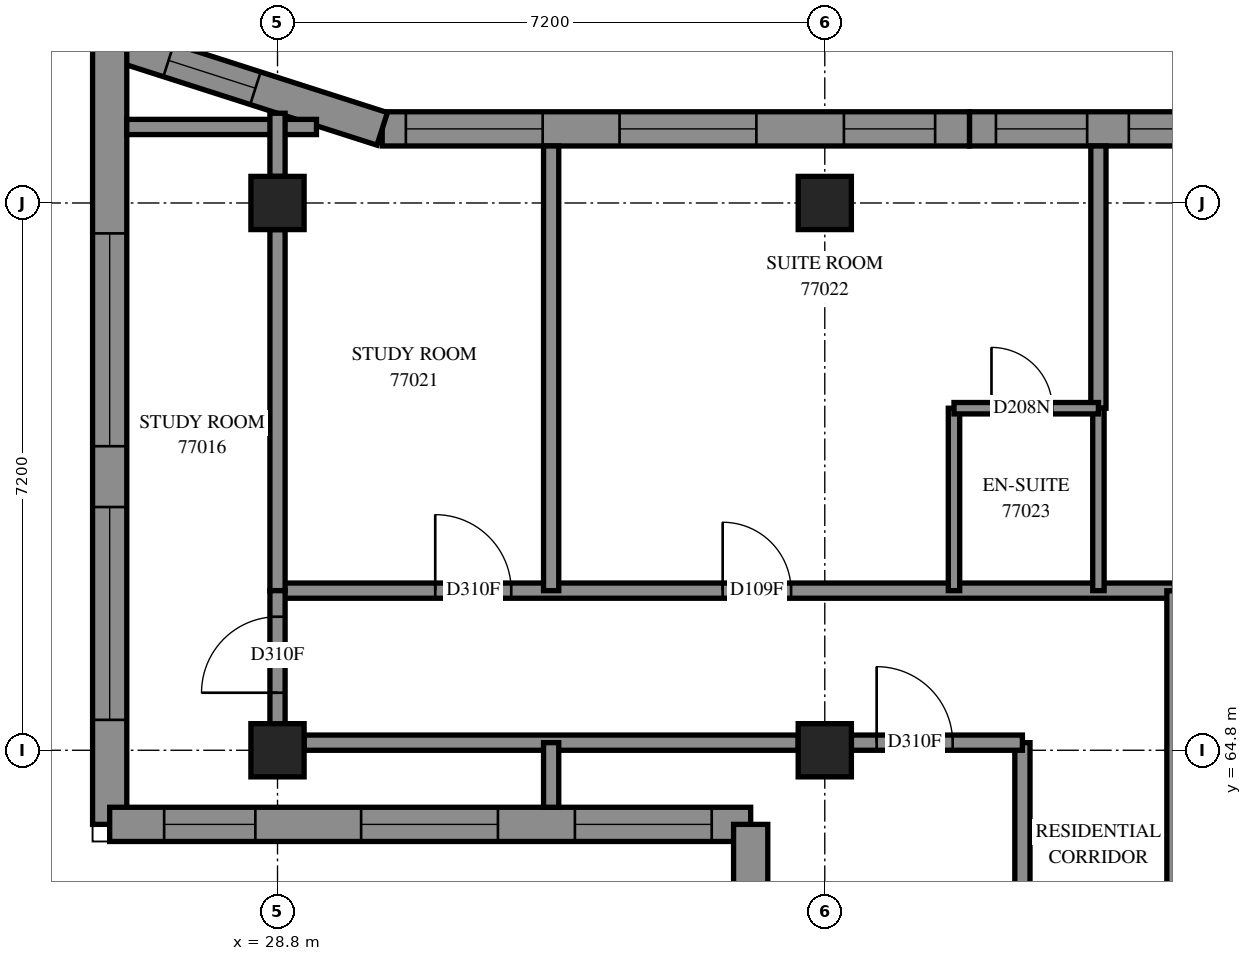
"""IFC4 building model, lengths in metres.
Left out: names, types, materials, properties, quantities, classifications, styles, units other than length and angle.
Written with IfcOpenShell. Run it as: python <this file> out.ifc"""

import sys

from ifc_helpers import new_model, si_unit, direction, frame, frame_2d, origin, origin_2d, place, context, subcontext, project, spatial, polyline, rectangle, outline, extrude, element, fill, save


model = new_model("IFC4")
c1 = context("Model", 3, precision=1e-05, world=origin(), true_north=direction((0.0, 1.0)))
c2 = subcontext(c1, "Body", "Model", "MODEL_VIEW")
j1 = project(units=[si_unit("LENGTHUNIT", "METRE"), si_unit("PLANEANGLEUNIT", "RADIAN")], contexts=[c1])
p1 = place(None, origin())
s1 = spatial("IfcSite", under=j1, at=p1, CompositionType="ELEMENT")
p2 = place(p1, origin())
s2 = spatial("IfcBuilding", under=s1, at=p2, CompositionType="ELEMENT")
p3 = place(p2, frame((0.0, 0.0, 281.2)))
s3 = spatial("IfcBuildingStorey", under=s2, at=p3, CompositionType="ELEMENT", Elevation=281.2)
for number, where, z_axis, x_axis in (
    (1, (28.8, 64.8, 0.0), (0.0, 0.0, 1.0), (1.0, 0.0, 0.0)),
    (2, (28.8, 72.0, 0.0), (0.0, 0.0, 1.0), (1.0, 0.0, 0.0)),
    (3, (36.0, 64.8, 0.0), (0.0, 0.0, 1.0), (1.0, 0.0, 0.0)),
    (4, (36.0, 72.0, 0.0), (0.0, 0.0, 1.0), (1.0, 0.0, 0.0)),
):
    element("IfcColumn", number, at=place(p3, frame(where, z_axis=z_axis, x_axis=x_axis)), inside=s3, PredefinedType="COLUMN", context=c2, shape_type="SweptSolid", body=[
        extrude(rectangle(XDim=0.7, YDim=0.7, at=origin_2d()), origin(), (0.0, 0.0, 1.0), 3.1),
    ])
p4 = place(p3, frame((45.594, 72.975, 0.0), z_axis=(0.0, 0.0, 1.0), x_axis=(-1.0, 0.0, 0.0)))
e5 = element("IfcWall", 5, at=p4, inside=s3, PredefinedType="SOLIDWALL", context=c2, shape_type="SweptSolid", body=[
    extrude(outline(polyline([(0.0, -0.225), (7.691, -0.225), (7.691, 0.225), (0.0, 0.225), (0.0, -0.225)])), origin(), (0.0, 0.0, 1.0), 3.1),
])
p5 = place(p4, frame((2.794, 0.0, 0.45)))
e6 = element("IfcOpeningElement", 6, at=p5, cuts=e5, PredefinedType="OPENING", context=c2, shape_type="SweptSolid", body=[
    extrude(rectangle(XDim=2.8, YDim=2.55, at=frame_2d((1.4, 1.275))), frame((0.0, 0.235, 0.0), z_axis=(0.0, -1.0, 0.0), x_axis=(1.0, 0.0, 0.0)), (0.0, 0.0, 1.0), 0.47),
])
p6 = place(p4, frame((0.697, 0.0, 0.45)))
e7 = element("IfcOpeningElement", 7, at=p6, cuts=e5, PredefinedType="OPENING", context=c2, shape_type="SweptSolid", body=[
    extrude(rectangle(XDim=1.2, YDim=2.55, at=frame_2d((0.6, 1.275))), frame((0.0, 0.235, 0.0), z_axis=(0.0, -1.0, 0.0), x_axis=(1.0, 0.0, 0.0)), (0.0, 0.0, 1.0), 0.47),
])
p7 = place(p4, frame((6.143, 0.0, 0.45)))
e8 = element("IfcOpeningElement", 8, at=p7, cuts=e5, PredefinedType="OPENING", context=c2, shape_type="SweptSolid", body=[
    extrude(rectangle(XDim=1.2, YDim=2.55, at=frame_2d((0.6, 1.275))), frame((0.0, 0.235, 0.0), z_axis=(0.0, -1.0, 0.0), x_axis=(1.0, 0.0, 0.0)), (0.0, 0.0, 1.0), 0.47),
])
p8 = place(p3, frame((37.903, 72.975, 0.0), z_axis=(0.0, 0.0, 1.0), x_axis=(-1.0, 0.0, 0.0)))
e9 = element("IfcWall", 9, at=p8, inside=s3, PredefinedType="SOLIDWALL", context=c2, shape_type="SweptSolid", body=[
    extrude(outline(polyline([(0.0, -0.225), (7.691, -0.225), (7.761, 0.225), (0.0, 0.225), (0.0, -0.225)])), origin(), (0.0, 0.0, 1.0), 2.6),
])
p9 = place(p8, frame((2.803, 0.0, 0.6)))
e10 = element("IfcOpeningElement", 10, at=p9, cuts=e9, PredefinedType="OPENING", context=c2, shape_type="SweptSolid", body=[
    extrude(rectangle(XDim=1.8, YDim=1.9, at=frame_2d((0.9, 0.95))), frame((0.0, 0.235, 0.0), z_axis=(0.0, -1.0, 0.0), x_axis=(1.0, 0.0, 0.0)), (0.0, 0.0, 1.0), 0.47),
])
p10 = place(p8, frame((5.615, 0.0, 0.6)))
e11 = element("IfcOpeningElement", 11, at=p10, cuts=e9, PredefinedType="OPENING", context=c2, shape_type="SweptSolid", body=[
    extrude(rectangle(XDim=1.8, YDim=1.9, at=frame_2d((0.9, 0.95))), frame((0.0, 0.235, 0.0), z_axis=(0.0, -1.0, 0.0), x_axis=(1.0, 0.0, 0.0)), (0.0, 0.0, 1.0), 0.47),
])
p11 = place(p8, frame((0.452, 0.0, 0.6)))
e12 = element("IfcOpeningElement", 12, at=p11, cuts=e9, PredefinedType="OPENING", context=c2, shape_type="SweptSolid", body=[
    extrude(rectangle(XDim=1.2, YDim=1.9, at=frame_2d((0.6, 0.95))), frame((0.0, 0.235, 0.0), z_axis=(0.0, -1.0, 0.0), x_axis=(1.0, 0.0, 0.0)), (0.0, 0.0, 1.0), 0.47),
])
p12 = place(p3, frame((30.177, 72.975, 0.0), z_axis=(0.0, 0.0, 1.0), x_axis=(-0.9522463551, 0.30533077, 0.0)))
e13 = element("IfcWall", 13, at=p12, inside=s3, PredefinedType="SOLIDWALL", context=c2, shape_type="SweptSolid", body=[
    extrude(outline(polyline([(0.035, -0.225), (4.074, -0.225), (3.457, 0.225), (-0.035, 0.225), (0.035, -0.225)])), origin(), (0.0, 0.0, 1.0), 3.1),
])
p13 = place(p12, frame((1.752, 0.0, 0.45)))
e14 = element("IfcOpeningElement", 14, at=p13, cuts=e13, PredefinedType="OPENING", context=c2, shape_type="SweptSolid", body=[
    extrude(rectangle(XDim=1.2, YDim=2.55, at=frame_2d((0.6, 1.275))), frame((0.0, 0.235, 0.0), z_axis=(0.0, -1.0, 0.0), x_axis=(1.0, 0.0, 0.0)), (0.0, 0.0, 1.0), 0.47),
])
p14 = place(p3, frame((26.592, 74.125, 0.0), z_axis=(0.0, 0.0, 1.0), x_axis=(0.0, -1.0, 0.0)))
e15 = element("IfcWall", 15, at=p14, inside=s3, PredefinedType="SOLIDWALL", context=c2, shape_type="SweptSolid", body=[
    extrude(outline(polyline([(-0.308, -0.225), (10.525, -0.225), (10.075, 0.225), (0.308, 0.225), (-0.308, -0.225)])), origin(), (0.0, 0.0, 1.0), 3.1),
])
p15 = place(p14, frame((2.525, 0.0, 0.45)))
e16 = element("IfcOpeningElement", 16, at=p15, cuts=e15, PredefinedType="OPENING", context=c2, shape_type="SweptSolid", body=[
    extrude(rectangle(XDim=2.8, YDim=2.55, at=frame_2d((1.4, 1.275))), frame((0.0, 0.235, 0.0), z_axis=(0.0, -1.0, 0.0), x_axis=(1.0, 0.0, 0.0)), (0.0, 0.0, 1.0), 0.47),
])
p16 = place(p14, frame((6.125, 0.0, 0.45)))
e17 = element("IfcOpeningElement", 17, at=p16, cuts=e15, PredefinedType="OPENING", context=c2, shape_type="SweptSolid", body=[
    extrude(rectangle(XDim=2.8, YDim=2.55, at=frame_2d((1.4, 1.275))), frame((0.0, 0.235, 0.0), z_axis=(0.0, -1.0, 0.0), x_axis=(1.0, 0.0, 0.0)), (0.0, 0.0, 1.0), 0.47),
])
p17 = place(p3, frame((26.592, 63.825, 0.0), z_axis=(0.0, 0.0, 1.0), x_axis=(1.0, 0.0, 0.0)))
e18 = element("IfcWall", 18, at=p17, inside=s3, PredefinedType="SOLIDWALL", context=c2, shape_type="SweptSolid", body=[
    extrude(outline(polyline([(-0.225, -0.225), (8.208, -0.225), (8.658, 0.225), (0.225, 0.225), (-0.225, -0.225)])), origin(), (0.0, 0.0, 1.0), 2.6),
])
p18 = place(p17, frame((3.308, 0.0, 0.6)))
e19 = element("IfcOpeningElement", 19, at=p18, cuts=e18, PredefinedType="OPENING", context=c2, shape_type="SweptSolid", body=[
    extrude(rectangle(XDim=1.8, YDim=1.9, at=frame_2d((0.9, 0.95))), frame((0.0, 0.235, 0.0), z_axis=(0.0, -1.0, 0.0), x_axis=(1.0, 0.0, 0.0)), (0.0, 0.0, 1.0), 0.47),
])
p19 = place(p17, frame((6.12, 0.0, 0.6)))
e20 = element("IfcOpeningElement", 20, at=p19, cuts=e18, PredefinedType="OPENING", context=c2, shape_type="SweptSolid", body=[
    extrude(rectangle(XDim=1.8, YDim=1.9, at=frame_2d((0.9, 0.95))), frame((0.0, 0.235, 0.0), z_axis=(0.0, -1.0, 0.0), x_axis=(1.0, 0.0, 0.0)), (0.0, 0.0, 1.0), 0.47),
])
p20 = place(p17, frame((0.717, 0.0, 0.6)))
e21 = element("IfcOpeningElement", 21, at=p20, cuts=e18, PredefinedType="OPENING", context=c2, shape_type="SweptSolid", body=[
    extrude(rectangle(XDim=1.2, YDim=1.9, at=frame_2d((0.6, 0.95))), frame((0.0, 0.235, 0.0), z_axis=(0.0, -1.0, 0.0), x_axis=(1.0, 0.0, 0.0)), (0.0, 0.0, 1.0), 0.47),
])
p21 = place(p3, frame((35.025, 63.825, 0.0), z_axis=(0.0, 0.0, 1.0), x_axis=(0.0, -1.0, 0.0)))
e22 = element("IfcWall", 22, at=p21, inside=s3, PredefinedType="SOLIDWALL", context=c2, shape_type="SweptSolid", body=[
    extrude(outline(polyline([(0.225, -0.225), (7.425, -0.225), (6.975, 0.225), (-0.225, 0.225), (0.225, -0.225)])), origin(), (0.0, 0.0, 1.0), 2.6),
])
p22 = place(p21, frame((3.725, 0.0, 0.6)))
e23 = element("IfcOpeningElement", 23, at=p22, cuts=e22, PredefinedType="OPENING", context=c2, shape_type="SweptSolid", body=[
    extrude(rectangle(XDim=1.8, YDim=1.9, at=frame_2d((0.9, 0.95))), frame((0.0, 0.235, 0.0), z_axis=(0.0, -1.0, 0.0), x_axis=(1.0, 0.0, 0.0)), (0.0, 0.0, 1.0), 0.47),
])
p23 = place(p21, frame((2.1, 0.0, 0.6)))
e24 = element("IfcOpeningElement", 24, at=p23, cuts=e22, PredefinedType="OPENING", context=c2, shape_type="SweptSolid", body=[
    extrude(rectangle(XDim=1.2, YDim=1.9, at=frame_2d((0.6, 0.95))), frame((0.0, 0.235, 0.0), z_axis=(0.0, -1.0, 0.0), x_axis=(1.0, 0.0, 0.0)), (0.0, 0.0, 1.0), 0.47),
])
p24 = place(p3, frame((28.8, 66.9, 0.0), z_axis=(0.0, 0.0, 1.0), x_axis=(1.0, 0.0, 0.0)))
e25 = element("IfcWall", 25, at=p24, inside=s3, PredefinedType="PARTITIONING", context=c2, shape_type="SweptSolid", body=[
    extrude(rectangle(XDim=11.8, YDim=0.2, at=frame_2d((5.9, 0.0))), origin(), (0.0, 0.0, 1.0), 3.1),
])
p25 = place(p24, frame((2.075, 0.0, 0.0)))
e26 = element("IfcOpeningElement", 26, at=p25, cuts=e25, PredefinedType="OPENING", context=c2, shape_type="SweptSolid", body=[
    extrude(rectangle(XDim=1.0, YDim=2.1, at=frame_2d((0.5, 1.05))), frame((0.0, 0.11, 0.0), z_axis=(0.0, -1.0, 0.0), x_axis=(1.0, 0.0, 0.0)), (0.0, 0.0, 1.0), 0.22),
])
p26 = place(p24, frame((5.857, 0.0, 0.0)))
e27 = element("IfcOpeningElement", 27, at=p26, cuts=e25, PredefinedType="OPENING", context=c2, shape_type="SweptSolid", body=[
    extrude(rectangle(XDim=0.9, YDim=2.1, at=frame_2d((0.45, 1.05))), frame((0.0, 0.11, 0.0), z_axis=(0.0, -1.0, 0.0), x_axis=(1.0, 0.0, 0.0)), (0.0, 0.0, 1.0), 0.22),
])
p27 = place(p3, frame((29.15, 64.9, 0.0), z_axis=(0.0, 0.0, 1.0), x_axis=(1.0, 0.0, 0.0)))
e28 = element("IfcWall", 28, at=p27, inside=s3, PredefinedType="PARTITIONING", context=c2, shape_type="SweptSolid", body=[
    extrude(rectangle(XDim=6.5, YDim=0.2, at=frame_2d((3.25, 0.0))), origin(), (0.0, 0.0, 1.0), 2.6),
])
p28 = place(p3, frame((32.4, 66.9, 0.0), z_axis=(0.0, 0.0, 1.0), x_axis=(0.0, 1.0, 0.0)))
e29 = element("IfcWall", 29, at=p28, inside=s3, PredefinedType="PARTITIONING", context=c2, shape_type="SweptSolid", body=[
    extrude(rectangle(XDim=5.85, YDim=0.2, at=frame_2d((2.925, 0.0))), origin(), (0.0, 0.0, 1.0), 3.1),
])
p29 = place(p3, frame((28.8, 66.9, 0.0), z_axis=(0.0, 0.0, 1.0), x_axis=(0.0, 1.0, 0.0)))
e30 = element("IfcWall", 30, at=p29, inside=s3, PredefinedType="PARTITIONING", context=c2, shape_type="SweptSolid", body=[
    extrude(rectangle(XDim=4.75, YDim=0.2, at=frame_2d((2.375, 0.0))), origin(), (0.0, 0.0, 1.0), 2.6),
])
p30 = place(p3, frame((40.6, 62.202, 0.0), z_axis=(0.0, 0.0, 1.0), x_axis=(0.0, 1.0, 0.0)))
e31 = element("IfcWall", 31, at=p30, inside=s3, PredefinedType="PARTITIONING", context=c2, shape_type="SweptSolid", body=[
    extrude(rectangle(XDim=4.696, YDim=0.2, at=frame_2d((2.348, 0.0))), origin(), (0.0, 0.0, 1.0), 3.1),
])
p31 = place(p3, frame((39.6, 69.3, 0.0), z_axis=(0.0, 0.0, 1.0), x_axis=(0.0, 1.0, 0.0)))
e32 = element("IfcWall", 32, at=p31, inside=s3, PredefinedType="PARTITIONING", context=c2, shape_type="SweptSolid", body=[
    extrude(rectangle(XDim=3.45, YDim=0.2, at=frame_2d((1.725, 0.0))), origin(), (0.0, 0.0, 1.0), 3.1),
])
p32 = place(p3, frame((38.6, 62.202, 0.0), z_axis=(0.0, 0.0, 1.0), x_axis=(0.0, 1.0, 0.0)))
e33 = element("IfcWall", 33, at=p32, inside=s3, PredefinedType="PARTITIONING", context=c2, shape_type="SweptSolid", body=[
    extrude(rectangle(XDim=2.698, YDim=0.2, at=frame_2d((1.349, 0.0))), origin(), (0.0, 0.0, 1.0), 3.1),
])
p33 = place(p3, frame((26.817, 73.0, 0.0), z_axis=(0.0, 0.0, 1.0), x_axis=(1.0, 0.0, 0.0)))
e34 = element("IfcWall", 34, at=p33, inside=s3, PredefinedType="PARTITIONING", context=c2, shape_type="SweptSolid", body=[
    extrude(rectangle(XDim=2.495, YDim=0.2, at=frame_2d((1.248, 0.0))), origin(), (0.0, 0.0, 1.0), 3.1),
])
for number, where, z_axis, x_axis in (
    (35, (37.7, 66.9, 0.0), (0.0, 0.0, 1.0), (0.0, 1.0, 0.0)),
    (36, (39.6, 66.9, 0.0), (0.0, 0.0, 1.0), (0.0, 1.0, 0.0)),
):
    element("IfcWall", number, at=place(p3, frame(where, z_axis=z_axis, x_axis=x_axis)), inside=s3, PredefinedType="PARTITIONING", context=c2, shape_type="SweptSolid", body=[
        extrude(rectangle(XDim=2.4, YDim=0.15, at=frame_2d((1.2, 0.0))), origin(), (0.0, 0.0, 1.0), 3.1),
    ])
p34 = place(p3, frame((36.35, 64.9, 0.0), z_axis=(0.0, 0.0, 1.0), x_axis=(1.0, 0.0, 0.0)))
e37 = element("IfcWall", 37, at=p34, inside=s3, PredefinedType="PARTITIONING", context=c2, shape_type="SweptSolid", body=[
    extrude(rectangle(XDim=2.25, YDim=0.2, at=frame_2d((1.125, 0.0))), origin(), (0.0, 0.0, 1.0), 3.1),
])
p35 = place(p34, frame((0.333, 0.0, 0.0)))
e38 = element("IfcOpeningElement", 38, at=p35, cuts=e37, PredefinedType="OPENING", context=c2, shape_type="SweptSolid", body=[
    extrude(rectangle(XDim=1.0, YDim=2.1, at=frame_2d((0.5, 1.05))), frame((0.0, 0.11, 0.0), z_axis=(0.0, -1.0, 0.0), x_axis=(1.0, 0.0, 0.0)), (0.0, 0.0, 1.0), 0.22),
])
p36 = place(p3, frame((37.7, 69.3, 0.0), z_axis=(0.0, 0.0, 1.0), x_axis=(1.0, 0.0, 0.0)))
e39 = element("IfcWall", 39, at=p36, inside=s3, PredefinedType="PARTITIONING", context=c2, shape_type="SweptSolid", body=[
    extrude(rectangle(XDim=1.9, YDim=0.15, at=frame_2d((0.95, 0.0))), origin(), (0.0, 0.0, 1.0), 3.1),
])
p37 = place(p36, frame((0.493, 0.0, 0.0)))
e40 = element("IfcOpeningElement", 40, at=p37, cuts=e39, PredefinedType="OPENING", context=c2, shape_type="SweptSolid", body=[
    extrude(rectangle(XDim=0.8, YDim=2.1, at=frame_2d((0.4, 1.05))), frame((0.0, 0.085, 0.0), z_axis=(0.0, -1.0, 0.0), x_axis=(1.0, 0.0, 0.0)), (0.0, 0.0, 1.0), 0.17),
])
p38 = place(p3, frame((28.8, 65.15, 0.0), z_axis=(0.0, 0.0, 1.0), x_axis=(0.0, 1.0, 0.0)))
e41 = element("IfcWall", 41, at=p38, inside=s3, PredefinedType="PARTITIONING", context=c2, shape_type="SweptSolid", body=[
    extrude(rectangle(XDim=1.75, YDim=0.2, at=frame_2d((0.875, 0.0))), origin(), (0.0, 0.0, 1.0), 2.6),
])
p39 = place(p38, frame((0.407, 0.0, 0.0)))
e42 = element("IfcOpeningElement", 42, at=p39, cuts=e41, PredefinedType="OPENING", context=c2, shape_type="SweptSolid", body=[
    extrude(rectangle(XDim=1.0, YDim=2.1, at=frame_2d((0.5, 1.05))), frame((0.0, 0.11, 0.0), z_axis=(0.0, -1.0, 0.0), x_axis=(1.0, 0.0, 0.0)), (0.0, 0.0, 1.0), 0.22),
])
p40 = place(p3, frame((32.4, 64.05, 0.0), z_axis=(0.0, 0.0, 1.0), x_axis=(0.0, 1.0, 0.0)))
e43 = element("IfcWall", 43, at=p40, inside=s3, PredefinedType="PARTITIONING", context=c2, shape_type="SweptSolid", body=[
    extrude(rectangle(XDim=0.85, YDim=0.2, at=frame_2d((0.425, 0.0))), origin(), (0.0, 0.0, 1.0), 3.1),
])
p41 = place(p3, frame((28.8, 72.35, 0.0), z_axis=(0.0, 0.0, 1.0), x_axis=(0.0, 1.0, 0.0)))
e44 = element("IfcWall", 44, at=p41, inside=s3, PredefinedType="PARTITIONING", context=c2, shape_type="SweptSolid", body=[
    extrude(rectangle(XDim=0.83, YDim=0.2, at=frame_2d((0.415, 0.0))), origin(), (0.0, 0.0, 1.0), 3.1),
])
p42 = place(p5, origin())
e45 = element("IfcWindow", 45, at=p42, inside=s3, PartitioningType="SINGLE_PANEL", PredefinedType="WINDOW", context=c2, shape_type="SweptSolid", body=[
    extrude(rectangle(XDim=2.8, YDim=2.55, at=frame_2d((1.4, 1.275))), frame((0.0, 0.205, 0.0), z_axis=(0.0, -1.0, 0.0), x_axis=(1.0, 0.0, 0.0)), (0.0, 0.0, 1.0), 0.06),
])
fill(e6, e45)
p43 = place(p7, origin())
e46 = element("IfcWindow", 46, at=p43, inside=s3, PartitioningType="SINGLE_PANEL", PredefinedType="WINDOW", context=c2, shape_type="SweptSolid", body=[
    extrude(rectangle(XDim=1.2, YDim=2.55, at=frame_2d((0.6, 1.275))), frame((0.0, 0.205, 0.0), z_axis=(0.0, -1.0, 0.0), x_axis=(1.0, 0.0, 0.0)), (0.0, 0.0, 1.0), 0.06),
])
fill(e8, e46)
p44 = place(p9, origin())
e47 = element("IfcWindow", 47, at=p44, inside=s3, PartitioningType="SINGLE_PANEL", PredefinedType="WINDOW", context=c2, shape_type="SweptSolid", body=[
    extrude(rectangle(XDim=1.8, YDim=1.9, at=frame_2d((0.9, 0.95))), frame((0.0, 0.205, 0.0), z_axis=(0.0, -1.0, 0.0), x_axis=(1.0, 0.0, 0.0)), (0.0, 0.0, 1.0), 0.06),
])
fill(e10, e47)
p45 = place(p10, origin())
e48 = element("IfcWindow", 48, at=p45, inside=s3, PartitioningType="SINGLE_PANEL", PredefinedType="WINDOW", context=c2, shape_type="SweptSolid", body=[
    extrude(rectangle(XDim=1.8, YDim=1.9, at=frame_2d((0.9, 0.95))), frame((0.0, 0.195, 0.0), z_axis=(0.0, -1.0, 0.0), x_axis=(1.0, 0.0, 0.0)), (0.0, 0.0, 1.0), 0.06),
])
fill(e11, e48)
p46 = place(p11, origin())
e49 = element("IfcWindow", 49, at=p46, inside=s3, PartitioningType="SINGLE_PANEL", PredefinedType="WINDOW", context=c2, shape_type="SweptSolid", body=[
    extrude(rectangle(XDim=1.2, YDim=1.9, at=frame_2d((0.6, 0.95))), frame((0.0, 0.205, 0.0), z_axis=(0.0, -1.0, 0.0), x_axis=(1.0, 0.0, 0.0)), (0.0, 0.0, 1.0), 0.06),
])
fill(e12, e49)
p47 = place(p13, origin())
e50 = element("IfcWindow", 50, at=p47, inside=s3, PartitioningType="SINGLE_PANEL", PredefinedType="WINDOW", context=c2, shape_type="SweptSolid", body=[
    extrude(rectangle(XDim=1.2, YDim=2.55, at=frame_2d((0.6, 1.275))), frame((0.0, 0.205, 0.0), z_axis=(0.0, -1.0, 0.0), x_axis=(1.0, 0.0, 0.0)), (0.0, 0.0, 1.0), 0.06),
])
fill(e14, e50)
p48 = place(p15, origin())
e51 = element("IfcWindow", 51, at=p48, inside=s3, PartitioningType="SINGLE_PANEL", PredefinedType="WINDOW", context=c2, shape_type="SweptSolid", body=[
    extrude(rectangle(XDim=2.8, YDim=2.55, at=frame_2d((1.4, 1.275))), frame((0.0, 0.205, 0.0), z_axis=(0.0, -1.0, 0.0), x_axis=(1.0, 0.0, 0.0)), (0.0, 0.0, 1.0), 0.06),
])
fill(e16, e51)
p49 = place(p16, origin())
e52 = element("IfcWindow", 52, at=p49, inside=s3, PartitioningType="SINGLE_PANEL", PredefinedType="WINDOW", context=c2, shape_type="SweptSolid", body=[
    extrude(rectangle(XDim=2.8, YDim=2.55, at=frame_2d((1.4, 1.275))), frame((0.0, 0.205, 0.0), z_axis=(0.0, -1.0, 0.0), x_axis=(1.0, 0.0, 0.0)), (0.0, 0.0, 1.0), 0.06),
])
fill(e17, e52)
p50 = place(p18, origin())
e53 = element("IfcWindow", 53, at=p50, inside=s3, PartitioningType="SINGLE_PANEL", PredefinedType="WINDOW", context=c2, shape_type="SweptSolid", body=[
    extrude(rectangle(XDim=1.8, YDim=1.9, at=frame_2d((0.9, 0.95))), frame((0.0, 0.205, 0.0), z_axis=(0.0, -1.0, 0.0), x_axis=(1.0, 0.0, 0.0)), (0.0, 0.0, 1.0), 0.06),
])
fill(e19, e53)
p51 = place(p19, origin())
e54 = element("IfcWindow", 54, at=p51, inside=s3, PartitioningType="SINGLE_PANEL", PredefinedType="WINDOW", context=c2, shape_type="SweptSolid", body=[
    extrude(rectangle(XDim=1.8, YDim=1.9, at=frame_2d((0.9, 0.95))), frame((0.0, 0.205, 0.0), z_axis=(0.0, -1.0, 0.0), x_axis=(1.0, 0.0, 0.0)), (0.0, 0.0, 1.0), 0.06),
])
fill(e20, e54)
p52 = place(p20, origin())
e55 = element("IfcWindow", 55, at=p52, inside=s3, PartitioningType="SINGLE_PANEL", PredefinedType="WINDOW", context=c2, shape_type="SweptSolid", body=[
    extrude(rectangle(XDim=1.2, YDim=1.9, at=frame_2d((0.6, 0.95))), frame((0.0, 0.205, 0.0), z_axis=(0.0, -1.0, 0.0), x_axis=(1.0, 0.0, 0.0)), (0.0, 0.0, 1.0), 0.06),
])
fill(e21, e55)
p53 = place(p39, origin())
e56 = element("IfcDoor", 56, at=p53, inside=s3, OperationType="SINGLE_SWING_LEFT", PredefinedType="DOOR", context=c2, shape_type="SweptSolid", body=[
    extrude(rectangle(XDim=1.0, YDim=2.1, at=frame_2d((0.5, 1.05))), frame((0.0, 0.025, 0.0), z_axis=(0.0, -1.0, 0.0), x_axis=(1.0, 0.0, 0.0)), (0.0, 0.0, 1.0), 0.05),
])
fill(e42, e56)
p54 = place(p25, origin())
e57 = element("IfcDoor", 57, at=p54, inside=s3, OperationType="SINGLE_SWING_RIGHT", PredefinedType="DOOR", context=c2, shape_type="SweptSolid", body=[
    extrude(rectangle(XDim=1.0, YDim=2.1, at=frame_2d((0.5, 1.05))), frame((0.0, 0.025, 0.0), z_axis=(0.0, -1.0, 0.0), x_axis=(1.0, 0.0, 0.0)), (0.0, 0.0, 1.0), 0.05),
])
fill(e26, e57)
p55 = place(p26, origin())
e58 = element("IfcDoor", 58, at=p55, inside=s3, OperationType="SINGLE_SWING_LEFT", PredefinedType="DOOR", context=c2, shape_type="SweptSolid", body=[
    extrude(rectangle(XDim=0.9, YDim=2.1, at=frame_2d((0.45, 1.05))), frame((0.0, 0.025, 0.0), z_axis=(0.0, -1.0, 0.0), x_axis=(1.0, 0.0, 0.0)), (0.0, 0.0, 1.0), 0.05),
])
fill(e27, e58)
p56 = place(p37, origin())
e59 = element("IfcDoor", 59, at=p56, inside=s3, OperationType="SINGLE_SWING_RIGHT", PredefinedType="DOOR", context=c2, shape_type="SweptSolid", body=[
    extrude(rectangle(XDim=0.8, YDim=2.1, at=frame_2d((0.4, 1.05))), frame((0.0, 0.025, 0.0), z_axis=(0.0, -1.0, 0.0), x_axis=(1.0, 0.0, 0.0)), (0.0, 0.0, 1.0), 0.05),
])
fill(e40, e59)
p57 = place(p35, origin())
e60 = element("IfcDoor", 60, at=p57, inside=s3, OperationType="SINGLE_SWING_RIGHT", PredefinedType="DOOR", context=c2, shape_type="SweptSolid", body=[
    extrude(rectangle(XDim=1.0, YDim=2.1, at=frame_2d((0.5, 1.05))), frame((0.0, 0.025, 0.0), z_axis=(0.0, -1.0, 0.0), x_axis=(1.0, 0.0, 0.0)), (0.0, 0.0, 1.0), 0.05),
])
fill(e38, e60)
save(model, sys.argv[1])
